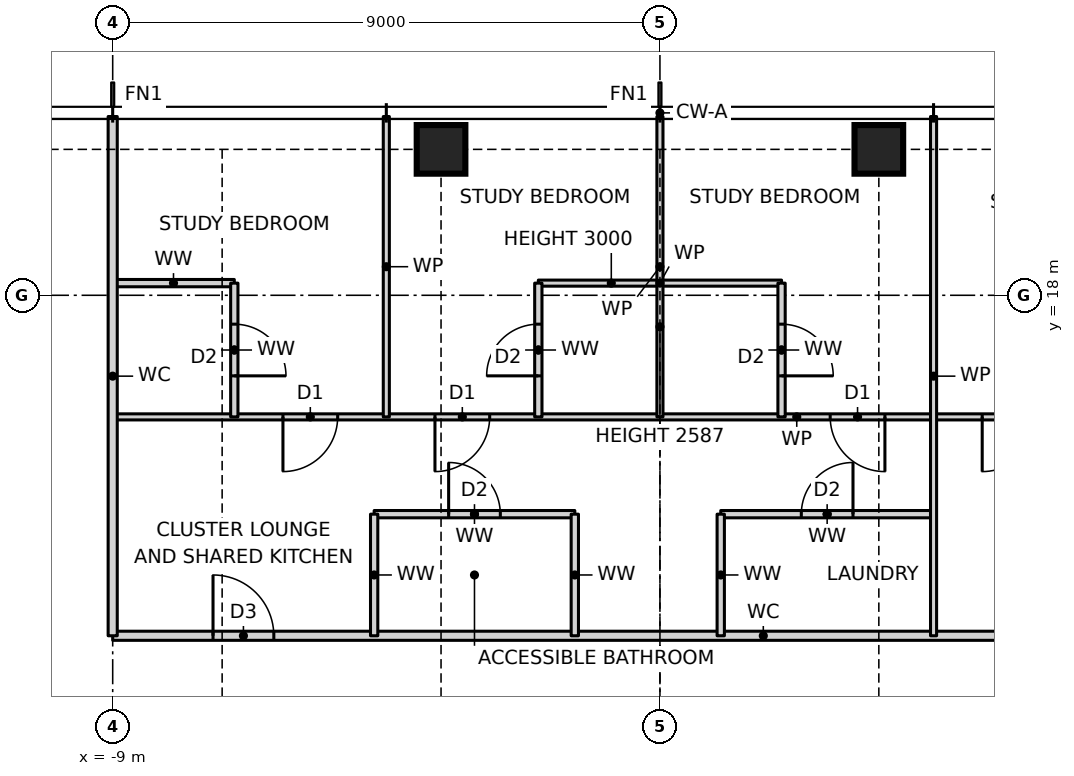
"""IFC4 building model, lengths in metres.
Left out: names, types, materials, properties, quantities, classifications, styles, units other than length and angle.
Written with IfcOpenShell. Run it as: python <this file> out.ifc"""

import sys

from ifc_helpers import new_model, si_unit, direction, frame, frame_2d, origin, origin_2d, place, context, subcontext, project, spatial, rectangle, hollow_rectangle, extrude, element, fill, save


model = new_model("IFC4")
c1 = context("Model", 3, precision=1e-05, world=origin(), true_north=direction((0.0, 1.0)))
c2 = subcontext(c1, "Body", "Model", "MODEL_VIEW")
j1 = project(units=[si_unit("LENGTHUNIT", "METRE"), si_unit("PLANEANGLEUNIT", "RADIAN")], contexts=[c1])
p1 = place(None, origin())
s1 = spatial("IfcSite", under=j1, at=p1, CompositionType="ELEMENT")
p2 = place(p1, origin())
s2 = spatial("IfcBuilding", under=s1, at=p2, CompositionType="ELEMENT")
p3 = place(p2, frame((0.0, 0.0, 122.5)))
s3 = spatial("IfcBuildingStorey", under=s2, at=p3, CompositionType="ELEMENT", Elevation=122.5)
for number, where, z_axis, x_axis in (
    (1, (3.6, 20.4, 0.0), (0.0, 0.0, 1.0), (1.0, 0.0, 0.0)),
    (2, (-3.6, 20.4, 0.0), (0.0, 0.0, 1.0), (1.0, 0.0, 0.0)),
):
    element("IfcColumn", number, at=place(p3, frame(where, z_axis=z_axis, x_axis=x_axis)), inside=s3, PredefinedType="COLUMN", context=c2, shape_type="SweptSolid", body=[
        extrude(hollow_rectangle(XDim=0.8, YDim=0.8, WallThickness=0.07, at=origin_2d()), origin(), (0.0, 0.0, 1.0), 3.5),
    ])
p4 = place(p3, frame((-9.0, 12.4, 0.0), z_axis=(0.0, 0.0, 1.0), x_axis=(1.0, 0.0, 0.0)))
e3 = element("IfcWall", 3, at=p4, inside=s3, PredefinedType="PARTITIONING", context=c2, shape_type="SweptSolid", body=[
    extrude(rectangle(XDim=21.4, YDim=0.15, at=frame_2d((10.7, 0.0))), origin(), (0.0, 0.0, 1.0), 3.27),
])
p5 = place(p4, frame((17.05, 0.0, 0.0)))
e4 = element("IfcOpeningElement", 4, at=p5, cuts=e3, PredefinedType="OPENING", context=c2, shape_type="SweptSolid", body=[
    extrude(rectangle(XDim=1.0, YDim=2.1, at=frame_2d((0.5, 1.05))), frame((0.0, 0.085, 0.0), z_axis=(0.0, -1.0, 0.0), x_axis=(1.0, 0.0, 0.0)), (0.0, 0.0, 1.0), 0.17),
])
p6 = place(p4, frame((1.65, 0.0, 0.0)))
e5 = element("IfcOpeningElement", 5, at=p6, cuts=e3, PredefinedType="OPENING", context=c2, shape_type="SweptSolid", body=[
    extrude(rectangle(XDim=1.0, YDim=2.1, at=frame_2d((0.5, 1.05))), frame((0.0, 0.085, 0.0), z_axis=(0.0, -1.0, 0.0), x_axis=(1.0, 0.0, 0.0)), (0.0, 0.0, 1.0), 0.17),
])
p7 = place(p3, frame((-4.7, 14.4, 0.0), z_axis=(0.0, 0.0, 1.0), x_axis=(1.0, 0.0, 0.0)))
e6 = element("IfcWall", 6, at=p7, inside=s3, PredefinedType="PARTITIONING", context=c2, shape_type="SweptSolid", body=[
    extrude(rectangle(XDim=3.3, YDim=0.12, at=frame_2d((1.65, 0.0))), origin(), (0.0, 0.0, 1.0), 3.27),
])
p8 = place(p7, frame((1.225, 0.0, 0.0)))
e7 = element("IfcOpeningElement", 7, at=p8, cuts=e6, PredefinedType="OPENING", context=c2, shape_type="SweptSolid", body=[
    extrude(rectangle(XDim=0.85, YDim=2.1, at=frame_2d((0.425, 1.05))), frame((0.0, 0.07, 0.0), z_axis=(0.0, -1.0, 0.0), x_axis=(1.0, 0.0, 0.0)), (0.0, 0.0, 1.0), 0.14),
])
p9 = place(p3, frame((1.0, 14.4, 0.0), z_axis=(0.0, 0.0, 1.0), x_axis=(1.0, 0.0, 0.0)))
e8 = element("IfcWall", 8, at=p9, inside=s3, PredefinedType="PARTITIONING", context=c2, shape_type="SweptSolid", body=[
    extrude(rectangle(XDim=3.5, YDim=0.12, at=frame_2d((1.75, 0.0))), origin(), (0.0, 0.0, 1.0), 3.27),
])
p10 = place(p9, frame((1.325, 0.0, 0.0)))
e9 = element("IfcOpeningElement", 9, at=p10, cuts=e8, PredefinedType="OPENING", context=c2, shape_type="SweptSolid", body=[
    extrude(rectangle(XDim=0.85, YDim=2.1, at=frame_2d((0.425, 1.05))), frame((0.0, 0.07, 0.0), z_axis=(0.0, -1.0, 0.0), x_axis=(1.0, 0.0, 0.0)), (0.0, 0.0, 1.0), 0.14),
])
p11 = place(p3, frame((-9.0, 16.0, 0.0), z_axis=(0.0, 0.0, 1.0), x_axis=(1.0, 0.0, 0.0)))
e10 = element("IfcWall", 10, at=p11, inside=s3, PredefinedType="PARTITIONING", context=c2, shape_type="SweptSolid", body=[
    extrude(rectangle(XDim=22.5, YDim=0.1, at=frame_2d((11.25, 0.0))), origin(), (0.0, 0.0, 1.0), 3.27),
])
p12 = place(p11, frame((20.8, 0.0, 0.0)))
e11 = element("IfcOpeningElement", 11, at=p12, cuts=e10, PredefinedType="OPENING", context=c2, shape_type="SweptSolid", body=[
    extrude(rectangle(XDim=0.9, YDim=2.1, at=frame_2d((0.45, 1.05))), frame((0.0, 0.06, 0.0), z_axis=(0.0, -1.0, 0.0), x_axis=(1.0, 0.0, 0.0)), (0.0, 0.0, 1.0), 0.12),
])
p13 = place(p11, frame((14.3, 0.0, 0.0)))
e12 = element("IfcOpeningElement", 12, at=p13, cuts=e10, PredefinedType="OPENING", context=c2, shape_type="SweptSolid", body=[
    extrude(rectangle(XDim=0.9, YDim=2.1, at=frame_2d((0.45, 1.05))), frame((0.0, 0.06, 0.0), z_axis=(0.0, -1.0, 0.0), x_axis=(1.0, 0.0, 0.0)), (0.0, 0.0, 1.0), 0.12),
])
p14 = place(p11, frame((11.8, 0.0, 0.0)))
e13 = element("IfcOpeningElement", 13, at=p14, cuts=e10, PredefinedType="OPENING", context=c2, shape_type="SweptSolid", body=[
    extrude(rectangle(XDim=0.9, YDim=2.1, at=frame_2d((0.45, 1.05))), frame((0.0, 0.06, 0.0), z_axis=(0.0, -1.0, 0.0), x_axis=(1.0, 0.0, 0.0)), (0.0, 0.0, 1.0), 0.12),
])
p15 = place(p11, frame((5.3, 0.0, 0.0)))
e14 = element("IfcOpeningElement", 14, at=p15, cuts=e10, PredefinedType="OPENING", context=c2, shape_type="SweptSolid", body=[
    extrude(rectangle(XDim=0.9, YDim=2.1, at=frame_2d((0.45, 1.05))), frame((0.0, 0.06, 0.0), z_axis=(0.0, -1.0, 0.0), x_axis=(1.0, 0.0, 0.0)), (0.0, 0.0, 1.0), 0.12),
])
p16 = place(p11, frame((2.8, 0.0, 0.0)))
e15 = element("IfcOpeningElement", 15, at=p16, cuts=e10, PredefinedType="OPENING", context=c2, shape_type="SweptSolid", body=[
    extrude(rectangle(XDim=0.9, YDim=2.1, at=frame_2d((0.45, 1.05))), frame((0.0, 0.06, 0.0), z_axis=(0.0, -1.0, 0.0), x_axis=(1.0, 0.0, 0.0)), (0.0, 0.0, 1.0), 0.12),
])
p17 = place(p3, frame((-9.0, 18.2, 0.0), z_axis=(0.0, 0.0, 1.0), x_axis=(1.0, 0.0, 0.0)))
e16 = element("IfcWall", 16, at=p17, inside=s3, PredefinedType="PARTITIONING", context=c2, shape_type="SweptSolid", body=[
    extrude(rectangle(XDim=2.0, YDim=0.12, at=frame_2d((1.0, 0.0))), origin(), (0.0, 0.0, 1.0), 3.27),
])
p18 = place(p3, frame((-2.0, 18.2, 0.0), z_axis=(0.0, 0.0, 1.0), x_axis=(1.0, 0.0, 0.0)))
e17 = element("IfcWall", 17, at=p18, inside=s3, PredefinedType="PARTITIONING", context=c2, shape_type="SweptSolid", body=[
    extrude(rectangle(XDim=4.0, YDim=0.1, at=frame_2d((2.0, 0.0))), origin(), (0.0, 0.0, 1.0), 3.0),
])
p19 = place(p3, frame((4.5, 12.4, 0.0), z_axis=(0.0, 0.0, 1.0), x_axis=(0.0, 1.0, 0.0)))
e18 = element("IfcWall", 18, at=p19, inside=s3, PredefinedType="PARTITIONING", context=c2, shape_type="SweptSolid", body=[
    extrude(rectangle(XDim=8.54, YDim=0.1, at=frame_2d((4.27, 0.0))), origin(), (0.0, 0.0, 1.0), 3.27),
])
p20 = place(p3, frame((2.0, 16.0, 0.0), z_axis=(0.0, 0.0, 1.0), x_axis=(0.0, 1.0, 0.0)))
e19 = element("IfcWall", 19, at=p20, inside=s3, PredefinedType="PARTITIONING", context=c2, shape_type="SweptSolid", body=[
    extrude(rectangle(XDim=2.2, YDim=0.12, at=frame_2d((1.1, 0.0))), origin(), (0.0, 0.0, 1.0), 3.27),
])
p21 = place(p20, frame((0.675, 0.0, 0.0)))
e20 = element("IfcOpeningElement", 20, at=p21, cuts=e19, PredefinedType="OPENING", context=c2, shape_type="SweptSolid", body=[
    extrude(rectangle(XDim=0.85, YDim=2.1, at=frame_2d((0.425, 1.05))), frame((0.0, 0.07, 0.0), z_axis=(0.0, -1.0, 0.0), x_axis=(1.0, 0.0, 0.0)), (0.0, 0.0, 1.0), 0.14),
])
p22 = place(p3, frame((1.0, 12.4, 0.0), z_axis=(0.0, 0.0, 1.0), x_axis=(0.0, 1.0, 0.0)))
e21 = element("IfcWall", 21, at=p22, inside=s3, PredefinedType="PARTITIONING", context=c2, shape_type="SweptSolid", body=[
    extrude(rectangle(XDim=2.0, YDim=0.12, at=frame_2d((1.0, 0.0))), origin(), (0.0, 0.0, 1.0), 3.27),
])
p23 = place(p3, frame((0.0, 16.0, 0.0), z_axis=(0.0, 0.0, 1.0), x_axis=(0.0, 1.0, 0.0)))
e22 = element("IfcWall", 22, at=p23, inside=s3, PredefinedType="PARTITIONING", context=c2, shape_type="SweptSolid", body=[
    extrude(rectangle(XDim=4.94, YDim=0.1, at=frame_2d((2.47, 0.0))), origin(), (0.0, 0.0, 1.0), 2.587),
])
p24 = place(p3, frame((-1.4, 12.4, 0.0), z_axis=(0.0, 0.0, 1.0), x_axis=(0.0, 1.0, 0.0)))
e23 = element("IfcWall", 23, at=p24, inside=s3, PredefinedType="PARTITIONING", context=c2, shape_type="SweptSolid", body=[
    extrude(rectangle(XDim=2.0, YDim=0.12, at=frame_2d((1.0, 0.0))), origin(), (0.0, 0.0, 1.0), 3.27),
])
p25 = place(p3, frame((-2.0, 16.0, 0.0), z_axis=(0.0, 0.0, 1.0), x_axis=(0.0, 1.0, 0.0)))
e24 = element("IfcWall", 24, at=p25, inside=s3, PredefinedType="PARTITIONING", context=c2, shape_type="SweptSolid", body=[
    extrude(rectangle(XDim=2.2, YDim=0.12, at=frame_2d((1.1, 0.0))), origin(), (0.0, 0.0, 1.0), 3.27),
])
p26 = place(p25, frame((0.675, 0.0, 0.0)))
e25 = element("IfcOpeningElement", 25, at=p26, cuts=e24, PredefinedType="OPENING", context=c2, shape_type="SweptSolid", body=[
    extrude(rectangle(XDim=0.85, YDim=2.1, at=frame_2d((0.425, 1.05))), frame((0.0, 0.07, 0.0), z_axis=(0.0, -1.0, 0.0), x_axis=(1.0, 0.0, 0.0)), (0.0, 0.0, 1.0), 0.14),
])
p27 = place(p3, frame((-4.5, 16.0, 0.0), z_axis=(0.0, 0.0, 1.0), x_axis=(0.0, 1.0, 0.0)))
e26 = element("IfcWall", 26, at=p27, inside=s3, PredefinedType="PARTITIONING", context=c2, shape_type="SweptSolid", body=[
    extrude(rectangle(XDim=4.94, YDim=0.1, at=frame_2d((2.47, 0.0))), origin(), (0.0, 0.0, 1.0), 3.27),
])
p28 = place(p3, frame((-4.7, 12.4, 0.0), z_axis=(0.0, 0.0, 1.0), x_axis=(0.0, 1.0, 0.0)))
e27 = element("IfcWall", 27, at=p28, inside=s3, PredefinedType="PARTITIONING", context=c2, shape_type="SweptSolid", body=[
    extrude(rectangle(XDim=2.0, YDim=0.12, at=frame_2d((1.0, 0.0))), origin(), (0.0, 0.0, 1.0), 3.27),
])
p29 = place(p3, frame((-7.0, 16.0, 0.0), z_axis=(0.0, 0.0, 1.0), x_axis=(0.0, 1.0, 0.0)))
e28 = element("IfcWall", 28, at=p29, inside=s3, PredefinedType="PARTITIONING", context=c2, shape_type="SweptSolid", body=[
    extrude(rectangle(XDim=2.2, YDim=0.12, at=frame_2d((1.1, 0.0))), origin(), (0.0, 0.0, 1.0), 3.27),
])
p30 = place(p29, frame((0.675, 0.0, 0.0)))
e29 = element("IfcOpeningElement", 29, at=p30, cuts=e28, PredefinedType="OPENING", context=c2, shape_type="SweptSolid", body=[
    extrude(rectangle(XDim=0.85, YDim=2.1, at=frame_2d((0.425, 1.05))), frame((0.0, 0.07, 0.0), z_axis=(0.0, -1.0, 0.0), x_axis=(1.0, 0.0, 0.0)), (0.0, 0.0, 1.0), 0.14),
])
p31 = place(p3, frame((-9.0, 12.4, 0.0), z_axis=(0.0, 0.0, 1.0), x_axis=(0.0, 1.0, 0.0)))
e30 = element("IfcWall", 30, at=p31, inside=s3, PredefinedType="PARTITIONING", context=c2, shape_type="SweptSolid", body=[
    extrude(rectangle(XDim=8.54, YDim=0.15, at=frame_2d((4.27, 0.0))), origin(), (0.0, 0.0, 1.0), 3.27),
])
p32 = place(p13, frame((0.9, 0.0, 0.0), z_axis=(0.0, 0.0, 1.0), x_axis=(-1.0, 0.0, 0.0)))
e31 = element("IfcDoor", 31, at=p32, inside=s3, OperationType="SINGLE_SWING_RIGHT", PredefinedType="DOOR", context=c2, shape_type="SweptSolid", body=[
    extrude(rectangle(XDim=0.9, YDim=2.1, at=frame_2d((0.45, 1.05))), frame((0.0, 0.025, 0.0), z_axis=(0.0, -1.0, 0.0), x_axis=(1.0, 0.0, 0.0)), (0.0, 0.0, 1.0), 0.05),
])
fill(e12, e31)
p33 = place(p21, frame((0.85, 0.0, 0.0), z_axis=(0.0, 0.0, 1.0), x_axis=(-1.0, 0.0, 0.0)))
e32 = element("IfcDoor", 32, at=p33, inside=s3, OperationType="SINGLE_SWING_RIGHT", PredefinedType="DOOR", context=c2, shape_type="SweptSolid", body=[
    extrude(rectangle(XDim=0.85, YDim=2.1, at=frame_2d((0.425, 1.05))), frame((0.0, 0.025, 0.0), z_axis=(0.0, -1.0, 0.0), x_axis=(1.0, 0.0, 0.0)), (0.0, 0.0, 1.0), 0.05),
])
fill(e20, e32)
p34 = place(p14, frame((0.9, 0.0, 0.0), z_axis=(0.0, 0.0, 1.0), x_axis=(-1.0, 0.0, 0.0)))
e33 = element("IfcDoor", 33, at=p34, inside=s3, OperationType="SINGLE_SWING_LEFT", PredefinedType="DOOR", context=c2, shape_type="SweptSolid", body=[
    extrude(rectangle(XDim=0.9, YDim=2.1, at=frame_2d((0.45, 1.05))), frame((0.0, 0.025, 0.0), z_axis=(0.0, -1.0, 0.0), x_axis=(1.0, 0.0, 0.0)), (0.0, 0.0, 1.0), 0.05),
])
fill(e13, e33)
p35 = place(p26, origin())
e34 = element("IfcDoor", 34, at=p35, inside=s3, OperationType="SINGLE_SWING_LEFT", PredefinedType="DOOR", context=c2, shape_type="SweptSolid", body=[
    extrude(rectangle(XDim=0.85, YDim=2.1, at=frame_2d((0.425, 1.05))), frame((0.0, 0.025, 0.0), z_axis=(0.0, -1.0, 0.0), x_axis=(1.0, 0.0, 0.0)), (0.0, 0.0, 1.0), 0.05),
])
fill(e25, e34)
p36 = place(p15, frame((0.9, 0.0, 0.0), z_axis=(0.0, 0.0, 1.0), x_axis=(-1.0, 0.0, 0.0)))
e35 = element("IfcDoor", 35, at=p36, inside=s3, OperationType="SINGLE_SWING_RIGHT", PredefinedType="DOOR", context=c2, shape_type="SweptSolid", body=[
    extrude(rectangle(XDim=0.9, YDim=2.1, at=frame_2d((0.45, 1.05))), frame((0.0, 0.025, 0.0), z_axis=(0.0, -1.0, 0.0), x_axis=(1.0, 0.0, 0.0)), (0.0, 0.0, 1.0), 0.05),
])
fill(e14, e35)
p37 = place(p30, frame((0.85, 0.0, 0.0), z_axis=(0.0, 0.0, 1.0), x_axis=(-1.0, 0.0, 0.0)))
e36 = element("IfcDoor", 36, at=p37, inside=s3, OperationType="SINGLE_SWING_RIGHT", PredefinedType="DOOR", context=c2, shape_type="SweptSolid", body=[
    extrude(rectangle(XDim=0.85, YDim=2.1, at=frame_2d((0.425, 1.05))), frame((0.0, 0.025, 0.0), z_axis=(0.0, -1.0, 0.0), x_axis=(1.0, 0.0, 0.0)), (0.0, 0.0, 1.0), 0.05),
])
fill(e29, e36)
p38 = place(p16, frame((0.9, 0.0, 0.0), z_axis=(0.0, 0.0, 1.0), x_axis=(-1.0, 0.0, 0.0)))
e37 = element("IfcDoor", 37, at=p38, inside=s3, OperationType="SINGLE_SWING_RIGHT", PredefinedType="DOOR", context=c2, shape_type="SweptSolid", body=[
    extrude(rectangle(XDim=0.9, YDim=2.1, at=frame_2d((0.45, 1.05))), frame((0.0, 0.025, 0.0), z_axis=(0.0, -1.0, 0.0), x_axis=(1.0, 0.0, 0.0)), (0.0, 0.0, 1.0), 0.05),
])
fill(e15, e37)
p39 = place(p6, origin())
e38 = element("IfcDoor", 38, at=p39, inside=s3, OperationType="SINGLE_SWING_LEFT", PredefinedType="DOOR", context=c2, shape_type="SweptSolid", body=[
    extrude(rectangle(XDim=1.0, YDim=2.1, at=frame_2d((0.5, 1.05))), frame((0.0, 0.025, 0.0), z_axis=(0.0, -1.0, 0.0), x_axis=(1.0, 0.0, 0.0)), (0.0, 0.0, 1.0), 0.05),
])
fill(e5, e38)
p40 = place(p10, origin())
e39 = element("IfcDoor", 39, at=p40, inside=s3, OperationType="SINGLE_SWING_RIGHT", PredefinedType="DOOR", context=c2, shape_type="SweptSolid", body=[
    extrude(rectangle(XDim=0.85, YDim=2.1, at=frame_2d((0.425, 1.05))), frame((0.0, 0.025, 0.0), z_axis=(0.0, -1.0, 0.0), x_axis=(1.0, 0.0, 0.0)), (0.0, 0.0, 1.0), 0.05),
])
fill(e9, e39)
p41 = place(p8, origin())
e40 = element("IfcDoor", 40, at=p41, inside=s3, OperationType="SINGLE_SWING_LEFT", PredefinedType="DOOR", context=c2, shape_type="SweptSolid", body=[
    extrude(rectangle(XDim=0.85, YDim=2.1, at=frame_2d((0.425, 1.05))), frame((0.0, 0.025, 0.0), z_axis=(0.0, -1.0, 0.0), x_axis=(1.0, 0.0, 0.0)), (0.0, 0.0, 1.0), 0.05),
])
fill(e7, e40)
save(model, sys.argv[1])
